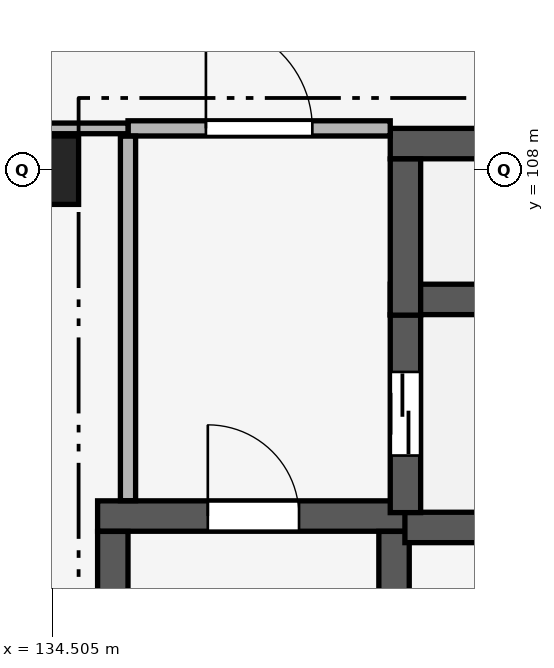
"""IFC4 building model, lengths in metres.
Left out: names, types, materials, properties, quantities, classifications, styles, units other than length and angle.
Written with IfcOpenShell. Run it as: python <this file> out.ifc"""

import sys

from ifc_helpers import new_model, si_unit, direction, frame, frame_2d, origin, origin_2d, place, context, subcontext, project, spatial, rectangle, extrude, element, fill, save


model = new_model("IFC4")
c1 = context("Model", 3, precision=1e-05, world=origin(), true_north=direction((0.0, 1.0)))
c2 = subcontext(c1, "Body", "Model", "MODEL_VIEW")
j1 = project(units=[si_unit("LENGTHUNIT", "METRE"), si_unit("PLANEANGLEUNIT", "RADIAN")], contexts=[c1])
p1 = place(None, origin())
s1 = spatial("IfcSite", under=j1, at=p1, CompositionType="ELEMENT")
p2 = place(p1, origin())
s2 = spatial("IfcBuilding", under=s1, at=p2, CompositionType="ELEMENT")
p3 = place(p2, frame((0.0, 0.0, -4.8)))
s3 = spatial("IfcBuildingStorey", under=s2, at=p3, CompositionType="ELEMENT", Elevation=-4.8)
p4 = place(p3, frame((134.4, 108.0, 0.0), z_axis=(0.0, 0.0, 1.0), x_axis=(1.0, 0.0, 0.0)))
e1 = element("IfcColumn", 1, at=p4, inside=s3, PredefinedType="COLUMN", context=c2, shape_type="SweptSolid", body=[
    extrude(rectangle(XDim=0.9, YDim=0.9, at=origin_2d()), origin(), (0.0, 0.0, 1.0), 4.8),
])
p5 = place(p3, frame((135.1, 103.45, 0.0), z_axis=(0.0, 0.0, 1.0), x_axis=(1.0, 0.0, 0.0)))
e2 = element("IfcWall", 2, at=p5, inside=s3, PredefinedType="SHEAR", context=c2, shape_type="SweptSolid", body=[
    extrude(rectangle(XDim=4.1, YDim=0.4, at=frame_2d((2.05, 0.0))), origin(), (0.0, 0.0, 1.0), 4.5),
])
p6 = place(p5, frame((1.45, 0.0, 0.0)))
e3 = element("IfcOpeningElement", 3, at=p6, cuts=e2, PredefinedType="OPENING", context=c2, shape_type="SweptSolid", body=[
    extrude(rectangle(XDim=1.2, YDim=2.2, at=frame_2d((0.6, 1.1))), frame((0.0, 0.215, 0.0), z_axis=(0.0, -1.0, 0.0), x_axis=(1.0, 0.0, 0.0)), (0.0, 0.0, 1.0), 0.43),
])
for number, where, z_axis, x_axis in (
    (4, (135.3, 96.352, 0.0), (0.0, 0.0, 1.0), (0.0, 1.0, 0.0)),
    (5, (139.0, 96.352, 0.0), (0.0, 0.0, 1.0), (0.0, 1.0, 0.0)),
):
    element("IfcWall", number, at=place(p3, frame(where, z_axis=z_axis, x_axis=x_axis)), inside=s3, PredefinedType="SHEAR", context=c2, shape_type="SweptSolid", body=[
        extrude(rectangle(XDim=6.896, YDim=0.4, at=frame_2d((3.448, 0.0))), origin(), (0.0, 0.0, 1.0), 4.5),
    ])
p7 = place(p3, frame((139.143, 103.3, 0.0), z_axis=(0.0, 0.0, 1.0), x_axis=(1.0, 0.0, 0.0)))
e6 = element("IfcWall", 6, at=p7, inside=s3, PredefinedType="SHEAR", context=c2, shape_type="SweptSolid", body=[
    extrude(rectangle(XDim=3.007, YDim=0.4, at=frame_2d((1.503, 0.0))), origin(), (0.0, 0.0, 1.0), 4.5),
])
p8 = place(p3, frame((138.95, 106.3, 0.0), z_axis=(0.0, 0.0, 1.0), x_axis=(1.0, 0.0, 0.0)))
e7 = element("IfcWall", 7, at=p8, inside=s3, PredefinedType="SHEAR", context=c2, shape_type="SweptSolid", body=[
    extrude(rectangle(XDim=3.2, YDim=0.4, at=frame_2d((1.6, 0.0))), origin(), (0.0, 0.0, 1.0), 4.5),
])
p9 = place(p3, frame((139.15, 103.495, 0.0), z_axis=(0.0, 0.0, 1.0), x_axis=(0.0, 1.0, 0.0)))
e8 = element("IfcWall", 8, at=p9, inside=s3, PredefinedType="SHEAR", context=c2, shape_type="SweptSolid", body=[
    extrude(rectangle(XDim=2.603, YDim=0.4, at=frame_2d((1.301, 0.0))), origin(), (0.0, 0.0, 1.0), 4.5),
])
p10 = place(p9, frame((0.751, 0.0, 0.0)))
e9 = element("IfcOpeningElement", 9, at=p10, cuts=e8, PredefinedType="OPENING", context=c2, shape_type="SweptSolid", body=[
    extrude(rectangle(XDim=1.1, YDim=2.15, at=frame_2d((0.55, 1.075))), frame((0.0, 0.215, 0.0), z_axis=(0.0, -1.0, 0.0), x_axis=(1.0, 0.0, 0.0)), (0.0, 0.0, 1.0), 0.43),
])
p11 = place(p3, frame((138.95, 108.35, 0.0), z_axis=(0.0, 0.0, 1.0), x_axis=(1.0, 0.0, 0.0)))
e10 = element("IfcWall", 10, at=p11, inside=s3, PredefinedType="SHEAR", context=c2, shape_type="SweptSolid", body=[
    extrude(rectangle(XDim=3.405, YDim=0.4, at=frame_2d((1.703, 0.0))), origin(), (0.0, 0.0, 1.0), 4.5),
])
p12 = place(p11, frame((1.153, 0.0, 0.0)))
e11 = element("IfcOpeningElement", 11, at=p12, cuts=e10, PredefinedType="OPENING", context=c2, shape_type="SweptSolid", body=[
    extrude(rectangle(XDim=1.1, YDim=2.15, at=frame_2d((0.55, 1.075))), frame((0.0, 0.215, 0.0), z_axis=(0.0, -1.0, 0.0), x_axis=(1.0, 0.0, 0.0)), (0.0, 0.0, 1.0), 0.43),
])
p13 = place(p3, frame((139.15, 106.093, 0.0), z_axis=(0.0, 0.0, 1.0), x_axis=(0.0, 1.0, 0.0)))
e12 = element("IfcWall", 12, at=p13, inside=s3, PredefinedType="SHEAR", context=c2, shape_type="SweptSolid", body=[
    extrude(rectangle(XDim=2.055, YDim=0.4, at=frame_2d((1.027, 0.0))), origin(), (0.0, 0.0, 1.0), 4.5),
])
p14 = place(p3, frame((135.5, 108.55, 0.0), z_axis=(0.0, 0.0, 1.0), x_axis=(1.0, 0.0, 0.0)))
e13 = element("IfcWall", 13, at=p14, inside=s3, PredefinedType="PARTITIONING", context=c2, shape_type="SweptSolid", body=[
    extrude(rectangle(XDim=3.45, YDim=0.2, at=frame_2d((1.725, 0.0))), origin(), (0.0, 0.0, 1.0), 4.5),
])
p15 = place(p14, frame((1.025, 0.0, 0.0)))
e14 = element("IfcOpeningElement", 14, at=p15, cuts=e13, PredefinedType="OPENING", context=c2, shape_type="SweptSolid", body=[
    extrude(rectangle(XDim=1.4, YDim=2.2, at=frame_2d((0.7, 1.1))), frame((0.0, 0.115, 0.0), z_axis=(0.0, -1.0, 0.0), x_axis=(1.0, 0.0, 0.0)), (0.0, 0.0, 1.0), 0.23),
])
p16 = place(p3, frame((134.27, 108.55, 0.0), z_axis=(0.0, 0.0, 1.0), x_axis=(1.0, 0.0, 0.0)))
e15 = element("IfcWall", 15, at=p16, inside=s3, PredefinedType="PARTITIONING", context=c2, shape_type="SweptSolid", body=[
    extrude(rectangle(XDim=1.23, YDim=0.14, at=frame_2d((0.615, 0.0))), origin(), (0.0, 0.0, 1.0), 3.85),
])
p17 = place(p3, frame((135.5, 103.652, 0.0), z_axis=(0.0, 0.0, 1.0), x_axis=(0.0, 1.0, 0.0)))
e16 = element("IfcWall", 16, at=p17, inside=s3, PredefinedType="PARTITIONING", context=c2, shape_type="SweptSolid", body=[
    extrude(rectangle(XDim=4.796, YDim=0.2, at=frame_2d((2.398, 0.0))), origin(), (0.0, 0.0, 1.0), 4.5),
])
p18 = place(p6, origin())
e17 = element("IfcDoor", 17, at=p18, inside=s3, OperationType="SINGLE_SWING_LEFT", PredefinedType="DOOR", context=c2, shape_type="SweptSolid", body=[
    extrude(rectangle(XDim=1.2, YDim=2.2, at=frame_2d((0.6, 1.1))), frame((0.0, 0.025, 0.0), z_axis=(0.0, -1.0, 0.0), x_axis=(1.0, 0.0, 0.0)), (0.0, 0.0, 1.0), 0.05),
])
fill(e3, e17)
p19 = place(p10, origin())
e18 = element("IfcDoor", 18, at=p19, inside=s3, OperationType="DOUBLE_DOOR_SLIDING", PredefinedType="DOOR", context=c2, shape_type="SweptSolid", body=[
    extrude(rectangle(XDim=1.1, YDim=2.15, at=frame_2d((0.55, 1.075))), frame((0.0, 0.025, 0.0), z_axis=(0.0, -1.0, 0.0), x_axis=(1.0, 0.0, 0.0)), (0.0, 0.0, 1.0), 0.05),
])
fill(e9, e18)
p20 = place(p15, origin())
e19 = element("IfcDoor", 19, at=p20, inside=s3, OperationType="SINGLE_SWING_LEFT", PredefinedType="DOOR", context=c2, shape_type="SweptSolid", body=[
    extrude(rectangle(XDim=1.4, YDim=2.2, at=frame_2d((0.7, 1.1))), frame((0.0, 0.025, 0.0), z_axis=(0.0, -1.0, 0.0), x_axis=(1.0, 0.0, 0.0)), (0.0, 0.0, 1.0), 0.05),
])
fill(e14, e19)
save(model, sys.argv[1])
